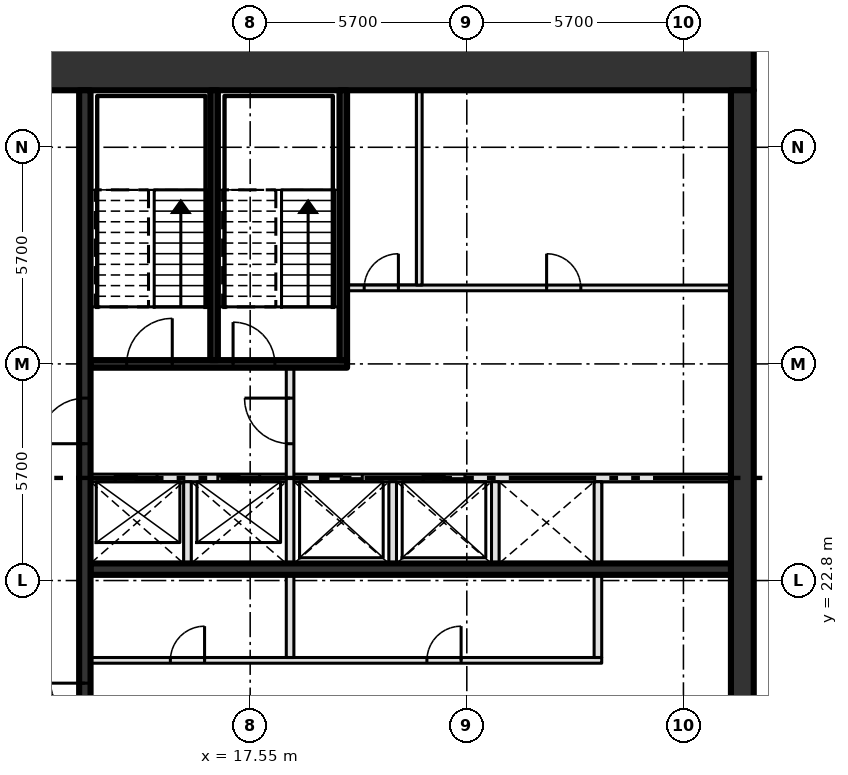
"""IFC4 building model, lengths in metres.
Left out: names, types, materials, properties, quantities, classifications, styles, units other than length and angle.
Written with IfcOpenShell. Run it as: python <this file> out.ifc"""

import sys

from ifc_helpers import new_model, si_unit, direction, frame, frame_2d, origin, place, context, subcontext, project, spatial, rectangle, extrude, element, fill, save


model = new_model("IFC4")
c1 = context("Model", 3, precision=1e-05, world=origin(), true_north=direction((0.0, 1.0)))
c2 = subcontext(c1, "Body", "Model", "MODEL_VIEW")
j1 = project(units=[si_unit("LENGTHUNIT", "METRE"), si_unit("PLANEANGLEUNIT", "RADIAN")], contexts=[c1])
p1 = place(None, origin())
s1 = spatial("IfcSite", under=j1, at=p1, CompositionType="ELEMENT")
p2 = place(p1, origin())
s2 = spatial("IfcBuilding", under=s1, at=p2, CompositionType="ELEMENT")
p3 = place(p2, frame((0.0, 0.0, 294.0)))
s3 = spatial("IfcBuildingStorey", under=s2, at=p3, CompositionType="ELEMENT", Elevation=294.0)
p4 = place(p3, frame((8.0, 36.3, -0.3), z_axis=(0.0, 0.0, 1.0), x_axis=(1.0, 0.0, 0.0)))
e1 = element("IfcWall", 1, at=p4, inside=s3, PredefinedType="SHEAR", context=c2, shape_type="SweptSolid", body=[
    extrude(rectangle(XDim=22.8, YDim=1.2, at=frame_2d((11.4, 0.0))), origin(), (0.0, 0.0, 1.0), 4.2),
])
p5 = place(p4, frame((2.3, 0.0, 0.3)))
e2 = element("IfcOpeningElement", 2, at=p5, cuts=e1, PredefinedType="OPENING", context=c2, shape_type="SweptSolid", body=[
    extrude(rectangle(XDim=1.8, YDim=2.1, at=frame_2d((0.9, 1.05))), frame((0.0, 0.61, 0.0), z_axis=(0.0, -1.0, 0.0), x_axis=(1.0, 0.0, 0.0)), (0.0, 0.0, 1.0), 1.22),
])
p6 = place(p3, frame((30.5, 14.7, -0.3), z_axis=(0.0, 0.0, 1.0), x_axis=(0.0, 1.0, 0.0)))
e3 = element("IfcWall", 3, at=p6, inside=s3, PredefinedType="SHEAR", context=c2, shape_type="SweptSolid", body=[
    extrude(rectangle(XDim=21.0, YDim=0.6, at=frame_2d((10.5, 0.0))), origin(), (0.0, 0.0, 1.0), 4.2),
])
p7 = place(p3, frame((13.35, 20.7, 0.0), z_axis=(0.0, 0.0, 1.0), x_axis=(1.0, 0.0, 0.0)))
e4 = element("IfcWall", 4, at=p7, inside=s3, PredefinedType="PARTITIONING", context=c2, shape_type="SweptSolid", body=[
    extrude(rectangle(XDim=13.45, YDim=0.15, at=frame_2d((6.725, 0.0))), origin(), (0.0, 0.0, 1.0), 3.9),
])
p8 = place(p7, frame((2.1, 0.0, 0.0)))
e5 = element("IfcOpeningElement", 5, at=p8, cuts=e4, PredefinedType="OPENING", context=c2, shape_type="SweptSolid", body=[
    extrude(rectangle(XDim=0.9, YDim=2.1, at=frame_2d((0.45, 1.05))), frame((0.0, 0.085, 0.0), z_axis=(0.0, -1.0, 0.0), x_axis=(1.0, 0.0, 0.0)), (0.0, 0.0, 1.0), 0.17),
])
p9 = place(p7, frame((8.85, 0.0, 0.0)))
e6 = element("IfcOpeningElement", 6, at=p9, cuts=e4, PredefinedType="OPENING", context=c2, shape_type="SweptSolid", body=[
    extrude(rectangle(XDim=0.9, YDim=2.1, at=frame_2d((0.45, 1.05))), frame((0.0, 0.085, 0.0), z_axis=(0.0, -1.0, 0.0), x_axis=(1.0, 0.0, 0.0)), (0.0, 0.0, 1.0), 0.17),
])
p10 = place(p3, frame((13.35, 23.1, 0.0), z_axis=(0.0, 0.0, 1.0), x_axis=(1.0, 0.0, 0.0)))
e7 = element("IfcWall", 7, at=p10, inside=s3, PredefinedType="SHEAR", context=c2, shape_type="SweptSolid", body=[
    extrude(rectangle(XDim=16.85, YDim=0.3, at=frame_2d((8.425, 0.0))), origin(), (0.0, 0.0, 1.0), 3.9),
])
p11 = place(p3, frame((13.35, 25.5, 0.0), z_axis=(0.0, 0.0, 1.0), x_axis=(1.0, 0.0, 0.0)))
e8 = element("IfcWall", 8, at=p11, inside=s3, PredefinedType="SOLIDWALL", context=c2, shape_type="SweptSolid", body=[
    extrude(rectangle(XDim=16.85, YDim=0.2, at=frame_2d((8.425, 0.0))), origin(), (0.0, 0.0, 1.0), 3.9),
])
p12 = place(p11, frame((0.65, 0.0, 0.0)))
e9 = element("IfcOpeningElement", 9, at=p12, cuts=e8, PredefinedType="OPENING", context=c2, shape_type="SweptSolid", body=[
    extrude(rectangle(XDim=1.1, YDim=2.1, at=frame_2d((0.55, 1.05))), frame((0.0, 0.11, 0.0), z_axis=(0.0, -1.0, 0.0), x_axis=(1.0, 0.0, 0.0)), (0.0, 0.0, 1.0), 0.22),
])
p13 = place(p11, frame((3.35, 0.0, 0.0)))
e10 = element("IfcOpeningElement", 10, at=p13, cuts=e8, PredefinedType="OPENING", context=c2, shape_type="SweptSolid", body=[
    extrude(rectangle(XDim=1.1, YDim=2.1, at=frame_2d((0.55, 1.05))), frame((0.0, 0.11, 0.0), z_axis=(0.0, -1.0, 0.0), x_axis=(1.0, 0.0, 0.0)), (0.0, 0.0, 1.0), 0.22),
])
p14 = place(p11, frame((6.05, 0.0, 0.0)))
e11 = element("IfcOpeningElement", 11, at=p14, cuts=e8, PredefinedType="OPENING", context=c2, shape_type="SweptSolid", body=[
    extrude(rectangle(XDim=1.1, YDim=2.1, at=frame_2d((0.55, 1.05))), frame((0.0, 0.11, 0.0), z_axis=(0.0, -1.0, 0.0), x_axis=(1.0, 0.0, 0.0)), (0.0, 0.0, 1.0), 0.22),
])
p15 = place(p11, frame((8.75, 0.0, 0.0)))
e12 = element("IfcOpeningElement", 12, at=p15, cuts=e8, PredefinedType="OPENING", context=c2, shape_type="SweptSolid", body=[
    extrude(rectangle(XDim=1.1, YDim=2.1, at=frame_2d((0.55, 1.05))), frame((0.0, 0.11, 0.0), z_axis=(0.0, -1.0, 0.0), x_axis=(1.0, 0.0, 0.0)), (0.0, 0.0, 1.0), 0.22),
])
p16 = place(p3, frame((13.35, 28.5, 0.0), z_axis=(0.0, 0.0, 1.0), x_axis=(1.0, 0.0, 0.0)))
e13 = element("IfcWall", 13, at=p16, inside=s3, PredefinedType="SOLIDWALL", context=c2, shape_type="SweptSolid", body=[
    extrude(rectangle(XDim=6.75, YDim=0.2, at=frame_2d((3.375, 0.0))), origin(), (0.0, 0.0, 1.0), 3.9),
])
p17 = place(p16, frame((0.95, 0.0, 0.0)))
e14 = element("IfcOpeningElement", 14, at=p17, cuts=e13, PredefinedType="OPENING", context=c2, shape_type="SweptSolid", body=[
    extrude(rectangle(XDim=1.2, YDim=2.1, at=frame_2d((0.6, 1.05))), frame((0.0, 0.11, 0.0), z_axis=(0.0, -1.0, 0.0), x_axis=(1.0, 0.0, 0.0)), (0.0, 0.0, 1.0), 0.22),
])
p18 = place(p16, frame((3.75, 0.0, 0.0)))
e15 = element("IfcOpeningElement", 15, at=p18, cuts=e13, PredefinedType="OPENING", context=c2, shape_type="SweptSolid", body=[
    extrude(rectangle(XDim=1.1, YDim=2.1, at=frame_2d((0.55, 1.05))), frame((0.0, 0.11, 0.0), z_axis=(0.0, -1.0, 0.0), x_axis=(1.0, 0.0, 0.0)), (0.0, 0.0, 1.0), 0.22),
])
p19 = place(p3, frame((20.1, 30.5, 0.0), z_axis=(0.0, 0.0, 1.0), x_axis=(1.0, 0.0, 0.0)))
e16 = element("IfcWall", 16, at=p19, inside=s3, PredefinedType="PARTITIONING", context=c2, shape_type="SweptSolid", body=[
    extrude(rectangle(XDim=10.1, YDim=0.15, at=frame_2d((5.05, 0.0))), origin(), (0.0, 0.0, 1.0), 3.9),
])
p20 = place(p19, frame((0.45, 0.0, 0.0)))
e17 = element("IfcOpeningElement", 17, at=p20, cuts=e16, PredefinedType="OPENING", context=c2, shape_type="SweptSolid", body=[
    extrude(rectangle(XDim=0.9, YDim=2.1, at=frame_2d((0.45, 1.05))), frame((0.0, 0.085, 0.0), z_axis=(0.0, -1.0, 0.0), x_axis=(1.0, 0.0, 0.0)), (0.0, 0.0, 1.0), 0.17),
])
p21 = place(p19, frame((5.25, 0.0, 0.0)))
e18 = element("IfcOpeningElement", 18, at=p21, cuts=e16, PredefinedType="OPENING", context=c2, shape_type="SweptSolid", body=[
    extrude(rectangle(XDim=0.9, YDim=2.1, at=frame_2d((0.45, 1.05))), frame((0.0, 0.085, 0.0), z_axis=(0.0, -1.0, 0.0), x_axis=(1.0, 0.0, 0.0)), (0.0, 0.0, 1.0), 0.17),
])
p22 = place(p3, frame((13.2, 14.7, 0.0), z_axis=(0.0, 0.0, 1.0), x_axis=(0.0, 1.0, 0.0)))
e19 = element("IfcWall", 19, at=p22, inside=s3, PredefinedType="SHEAR", context=c2, shape_type="SweptSolid", body=[
    extrude(rectangle(XDim=21.0, YDim=0.3, at=frame_2d((10.5, 0.0))), origin(), (0.0, 0.0, 1.0), 3.9),
])
p23 = place(p22, frame((3.6, 0.0, 0.0)))
e20 = element("IfcOpeningElement", 20, at=p23, cuts=e19, PredefinedType="OPENING", context=c2, shape_type="SweptSolid", body=[
    extrude(rectangle(XDim=1.8, YDim=2.1, at=frame_2d((0.9, 1.05))), frame((0.0, 0.16, 0.0), z_axis=(0.0, -1.0, 0.0), x_axis=(1.0, 0.0, 0.0)), (0.0, 0.0, 1.0), 0.32),
])
p24 = place(p22, frame((11.7, 0.0, 0.0)))
e21 = element("IfcOpeningElement", 21, at=p24, cuts=e19, PredefinedType="OPENING", context=c2, shape_type="SweptSolid", body=[
    extrude(rectangle(XDim=1.2, YDim=2.1, at=frame_2d((0.6, 1.05))), frame((0.0, 0.16, 0.0), z_axis=(0.0, -1.0, 0.0), x_axis=(1.0, 0.0, 0.0)), (0.0, 0.0, 1.0), 0.32),
])
p25 = place(p3, frame((15.9, 23.25, 0.0), z_axis=(0.0, 0.0, 1.0), x_axis=(0.0, 1.0, 0.0)))
e22 = element("IfcWall", 22, at=p25, inside=s3, PredefinedType="SOLIDWALL", context=c2, shape_type="SweptSolid", body=[
    extrude(rectangle(XDim=2.15, YDim=0.2, at=frame_2d((1.075, 0.0))), origin(), (0.0, 0.0, 1.0), 3.9),
])
p26 = place(p3, frame((16.6, 28.6, 0.0), z_axis=(0.0, 0.0, 1.0), x_axis=(0.0, 1.0, 0.0)))
e23 = element("IfcWall", 23, at=p26, inside=s3, PredefinedType="SOLIDWALL", context=c2, shape_type="SweptSolid", body=[
    extrude(rectangle(XDim=7.1, YDim=0.2, at=frame_2d((3.55, 0.0))), origin(), (0.0, 0.0, 1.0), 3.9),
])
p27 = place(p3, frame((18.6, 20.775, 0.0), z_axis=(0.0, 0.0, 1.0), x_axis=(0.0, 1.0, 0.0)))
e24 = element("IfcWall", 24, at=p27, inside=s3, PredefinedType="SOLIDWALL", context=c2, shape_type="SweptSolid", body=[
    extrude(rectangle(XDim=7.625, YDim=0.2, at=frame_2d((3.812, 0.0))), origin(), (0.0, 0.0, 1.0), 3.9),
])
p28 = place(p27, frame((5.625, 0.0, 0.0)))
e25 = element("IfcOpeningElement", 25, at=p28, cuts=e24, PredefinedType="OPENING", context=c2, shape_type="SweptSolid", body=[
    extrude(rectangle(XDim=1.2, YDim=2.1, at=frame_2d((0.6, 1.05))), frame((0.0, 0.11, 0.0), z_axis=(0.0, -1.0, 0.0), x_axis=(1.0, 0.0, 0.0)), (0.0, 0.0, 1.0), 0.22),
])
p29 = place(p3, frame((20.0, 28.6, 0.0), z_axis=(0.0, 0.0, 1.0), x_axis=(0.0, 1.0, 0.0)))
e26 = element("IfcWall", 26, at=p29, inside=s3, PredefinedType="SOLIDWALL", context=c2, shape_type="SweptSolid", body=[
    extrude(rectangle(XDim=7.1, YDim=0.2, at=frame_2d((3.55, 0.0))), origin(), (0.0, 0.0, 1.0), 3.9),
])
p30 = place(p3, frame((21.3, 23.25, 0.0), z_axis=(0.0, 0.0, 1.0), x_axis=(0.0, 1.0, 0.0)))
e27 = element("IfcWall", 27, at=p30, inside=s3, PredefinedType="SOLIDWALL", context=c2, shape_type="SweptSolid", body=[
    extrude(rectangle(XDim=2.15, YDim=0.2, at=frame_2d((1.075, 0.0))), origin(), (0.0, 0.0, 1.0), 3.9),
])
p31 = place(p3, frame((22.0, 30.575, 0.0), z_axis=(0.0, 0.0, 1.0), x_axis=(0.0, 1.0, 0.0)))
e28 = element("IfcWall", 28, at=p31, inside=s3, PredefinedType="PARTITIONING", context=c2, shape_type="SweptSolid", body=[
    extrude(rectangle(XDim=5.125, YDim=0.15, at=frame_2d((2.562, 0.0))), origin(), (0.0, 0.0, 1.0), 3.9),
])
p32 = place(p3, frame((24.0, 23.25, 0.0), z_axis=(0.0, 0.0, 1.0), x_axis=(0.0, 1.0, 0.0)))
e29 = element("IfcWall", 29, at=p32, inside=s3, PredefinedType="SOLIDWALL", context=c2, shape_type="SweptSolid", body=[
    extrude(rectangle(XDim=2.15, YDim=0.2, at=frame_2d((1.075, 0.0))), origin(), (0.0, 0.0, 1.0), 3.9),
])
p33 = place(p3, frame((26.7, 20.775, 0.0), z_axis=(0.0, 0.0, 1.0), x_axis=(0.0, 1.0, 0.0)))
e30 = element("IfcWall", 30, at=p33, inside=s3, PredefinedType="SOLIDWALL", context=c2, shape_type="SweptSolid", body=[
    extrude(rectangle(XDim=4.625, YDim=0.2, at=frame_2d((2.312, 0.0))), origin(), (0.0, 0.0, 1.0), 3.9),
])
p34 = place(p12, origin())
e31 = element("IfcDoor", 31, at=p34, inside=s3, OperationType="SLIDING_TO_LEFT", PredefinedType="DOOR", context=c2, shape_type="SweptSolid", body=[
    extrude(rectangle(XDim=1.1, YDim=2.1, at=frame_2d((0.55, 1.05))), frame((0.0, 0.025, 0.0), z_axis=(0.0, -1.0, 0.0), x_axis=(1.0, 0.0, 0.0)), (0.0, 0.0, 1.0), 0.05),
])
fill(e9, e31)
p35 = place(p13, origin())
e32 = element("IfcDoor", 32, at=p35, inside=s3, OperationType="SLIDING_TO_LEFT", PredefinedType="DOOR", context=c2, shape_type="SweptSolid", body=[
    extrude(rectangle(XDim=1.1, YDim=2.1, at=frame_2d((0.55, 1.05))), frame((0.0, 0.025, 0.0), z_axis=(0.0, -1.0, 0.0), x_axis=(1.0, 0.0, 0.0)), (0.0, 0.0, 1.0), 0.05),
])
fill(e10, e32)
p36 = place(p14, origin())
e33 = element("IfcDoor", 33, at=p36, inside=s3, OperationType="SLIDING_TO_LEFT", PredefinedType="DOOR", context=c2, shape_type="SweptSolid", body=[
    extrude(rectangle(XDim=1.1, YDim=2.1, at=frame_2d((0.55, 1.05))), frame((0.0, 0.025, 0.0), z_axis=(0.0, -1.0, 0.0), x_axis=(1.0, 0.0, 0.0)), (0.0, 0.0, 1.0), 0.05),
])
fill(e11, e33)
p37 = place(p15, origin())
e34 = element("IfcDoor", 34, at=p37, inside=s3, OperationType="SLIDING_TO_LEFT", PredefinedType="DOOR", context=c2, shape_type="SweptSolid", body=[
    extrude(rectangle(XDim=1.1, YDim=2.1, at=frame_2d((0.55, 1.05))), frame((0.0, 0.025, 0.0), z_axis=(0.0, -1.0, 0.0), x_axis=(1.0, 0.0, 0.0)), (0.0, 0.0, 1.0), 0.05),
])
fill(e12, e34)
p38 = place(p8, origin())
e35 = element("IfcDoor", 35, at=p38, inside=s3, OperationType="SINGLE_SWING_RIGHT", PredefinedType="DOOR", context=c2, shape_type="SweptSolid", body=[
    extrude(rectangle(XDim=0.9, YDim=2.1, at=frame_2d((0.45, 1.05))), frame((0.0, 0.025, 0.0), z_axis=(0.0, -1.0, 0.0), x_axis=(1.0, 0.0, 0.0)), (0.0, 0.0, 1.0), 0.05),
])
fill(e5, e35)
p39 = place(p9, origin())
e36 = element("IfcDoor", 36, at=p39, inside=s3, OperationType="SINGLE_SWING_RIGHT", PredefinedType="DOOR", context=c2, shape_type="SweptSolid", body=[
    extrude(rectangle(XDim=0.9, YDim=2.1, at=frame_2d((0.45, 1.05))), frame((0.0, 0.025, 0.0), z_axis=(0.0, -1.0, 0.0), x_axis=(1.0, 0.0, 0.0)), (0.0, 0.0, 1.0), 0.05),
])
fill(e6, e36)
p40 = place(p20, origin())
e37 = element("IfcDoor", 37, at=p40, inside=s3, OperationType="SINGLE_SWING_RIGHT", PredefinedType="DOOR", context=c2, shape_type="SweptSolid", body=[
    extrude(rectangle(XDim=0.9, YDim=2.1, at=frame_2d((0.45, 1.05))), frame((0.0, 0.025, 0.0), z_axis=(0.0, -1.0, 0.0), x_axis=(1.0, 0.0, 0.0)), (0.0, 0.0, 1.0), 0.05),
])
fill(e17, e37)
p41 = place(p21, origin())
e38 = element("IfcDoor", 38, at=p41, inside=s3, OperationType="SINGLE_SWING_LEFT", PredefinedType="DOOR", context=c2, shape_type="SweptSolid", body=[
    extrude(rectangle(XDim=0.9, YDim=2.1, at=frame_2d((0.45, 1.05))), frame((0.0, 0.025, 0.0), z_axis=(0.0, -1.0, 0.0), x_axis=(1.0, 0.0, 0.0)), (0.0, 0.0, 1.0), 0.05),
])
fill(e18, e38)
p42 = place(p17, origin())
e39 = element("IfcDoor", 39, at=p42, inside=s3, OperationType="SINGLE_SWING_RIGHT", PredefinedType="DOOR", context=c2, shape_type="SweptSolid", body=[
    extrude(rectangle(XDim=1.2, YDim=2.1, at=frame_2d((0.6, 1.05))), frame((0.0, 0.025, 0.0), z_axis=(0.0, -1.0, 0.0), x_axis=(1.0, 0.0, 0.0)), (0.0, 0.0, 1.0), 0.05),
])
fill(e14, e39)
p43 = place(p18, origin())
e40 = element("IfcDoor", 40, at=p43, inside=s3, OperationType="SINGLE_SWING_LEFT", PredefinedType="DOOR", context=c2, shape_type="SweptSolid", body=[
    extrude(rectangle(XDim=1.1, YDim=2.1, at=frame_2d((0.55, 1.05))), frame((0.0, 0.025, 0.0), z_axis=(0.0, -1.0, 0.0), x_axis=(1.0, 0.0, 0.0)), (0.0, 0.0, 1.0), 0.05),
])
fill(e15, e40)
p44 = place(p23, origin())
e41 = element("IfcDoor", 41, at=p44, inside=s3, OperationType="DOUBLE_DOOR_SINGLE_SWING", PredefinedType="DOOR", context=c2, shape_type="SweptSolid", body=[
    extrude(rectangle(XDim=1.8, YDim=2.1, at=frame_2d((0.9, 1.05))), frame((0.0, 0.025, 0.0), z_axis=(0.0, -1.0, 0.0), x_axis=(1.0, 0.0, 0.0)), (0.0, 0.0, 1.0), 0.05),
])
fill(e20, e41)
p45 = place(p24, origin())
e42 = element("IfcDoor", 42, at=p45, inside=s3, OperationType="SINGLE_SWING_LEFT", PredefinedType="DOOR", context=c2, shape_type="SweptSolid", body=[
    extrude(rectangle(XDim=1.2, YDim=2.1, at=frame_2d((0.6, 1.05))), frame((0.0, 0.025, 0.0), z_axis=(0.0, -1.0, 0.0), x_axis=(1.0, 0.0, 0.0)), (0.0, 0.0, 1.0), 0.05),
])
fill(e21, e42)
p46 = place(p28, origin())
e43 = element("IfcDoor", 43, at=p46, inside=s3, OperationType="SINGLE_SWING_RIGHT", PredefinedType="DOOR", context=c2, shape_type="SweptSolid", body=[
    extrude(rectangle(XDim=1.2, YDim=2.1, at=frame_2d((0.6, 1.05))), frame((0.0, 0.025, 0.0), z_axis=(0.0, -1.0, 0.0), x_axis=(1.0, 0.0, 0.0)), (0.0, 0.0, 1.0), 0.05),
])
fill(e25, e43)
save(model, sys.argv[1])
